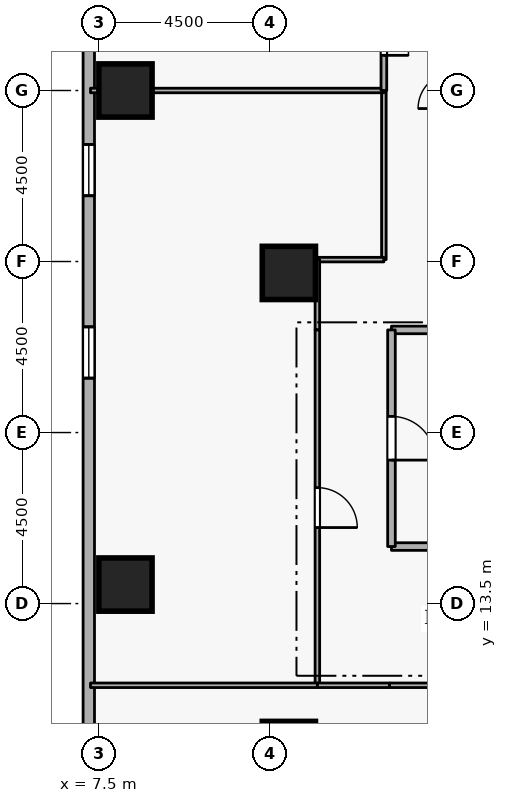
"""IFC4 building model, lengths in metres.
Left out: names, types, materials, properties, quantities, classifications, styles, units other than length and angle.
Written with IfcOpenShell. Run it as: python <this file> out.ifc"""

import sys

from ifc_helpers import new_model, si_unit, direction, frame, frame_2d, origin, origin_2d, place, context, subcontext, project, spatial, rectangle, extrude, element, fill, save


model = new_model("IFC4")
c1 = context("Model", 3, precision=1e-05, world=origin(), true_north=direction((0.0, 1.0)))
c2 = subcontext(c1, "Body", "Model", "MODEL_VIEW")
j1 = project(units=[si_unit("LENGTHUNIT", "METRE"), si_unit("PLANEANGLEUNIT", "RADIAN")], contexts=[c1])
p1 = place(None, origin())
s1 = spatial("IfcSite", under=j1, at=p1, CompositionType="ELEMENT")
p2 = place(p1, origin())
s2 = spatial("IfcBuilding", under=s1, at=p2, CompositionType="ELEMENT")
p3 = place(p2, frame((0.0, 0.0, 68.1)))
s3 = spatial("IfcBuildingStorey", under=s2, at=p3, CompositionType="ELEMENT", Elevation=68.1)
for number, where, z_axis, x_axis in (
    (1, (12.5, 9.7, 0.0), (0.0, 0.0, 1.0), (1.0, 0.0, 0.0)),
    (2, (8.2, 14.0, 0.0), (0.0, 0.0, 1.0), (1.0, 0.0, 0.0)),
    (3, (8.2, 27.0, 0.0), (0.0, 0.0, 1.0), (1.0, 0.0, 0.0)),
    (4, (12.5, 22.2, 0.0), (0.0, 0.0, 1.0), (1.0, 0.0, 0.0)),
):
    element("IfcColumn", number, at=place(p3, frame(where, z_axis=z_axis, x_axis=x_axis)), inside=s3, PredefinedType="COLUMN", context=c2, shape_type="SweptSolid", body=[
        extrude(rectangle(XDim=1.4, YDim=1.4, at=origin_2d()), origin(), (0.0, 0.0, 1.0), 3.6),
    ])
p4 = place(p3, frame((7.235, 42.681, 0.0), z_axis=(0.0, 0.0, 1.0), x_axis=(0.0, -1.0, 0.0)))
e5 = element("IfcWall", 5, at=p4, inside=s3, PredefinedType="STANDARD", context=c2, shape_type="SweptSolid", body=[
    extrude(rectangle(XDim=37.362, YDim=0.3, at=frame_2d((18.681, 0.0))), origin(), (0.0, 0.0, 1.0), 2.66),
])
p5 = place(p4, frame((7.5, 0.0, 0.72)))
e6 = element("IfcOpeningElement", 6, at=p5, cuts=e5, PredefinedType="OPENING", context=c2, shape_type="SweptSolid", body=[
    extrude(rectangle(XDim=1.35, YDim=1.05, at=frame_2d((0.675, 0.525))), frame((0.0, 0.16, 0.0), z_axis=(0.0, -1.0, 0.0), x_axis=(1.0, 0.0, 0.0)), (0.0, 0.0, 1.0), 0.32),
])
p6 = place(p4, frame((17.1, 0.0, 0.72)))
e7 = element("IfcOpeningElement", 7, at=p6, cuts=e5, PredefinedType="OPENING", context=c2, shape_type="SweptSolid", body=[
    extrude(rectangle(XDim=1.35, YDim=1.05, at=frame_2d((0.675, 0.525))), frame((0.0, 0.16, 0.0), z_axis=(0.0, -1.0, 0.0), x_axis=(1.0, 0.0, 0.0)), (0.0, 0.0, 1.0), 0.32),
])
p7 = place(p4, frame((21.9, 0.0, 0.72)))
e8 = element("IfcOpeningElement", 8, at=p7, cuts=e5, PredefinedType="OPENING", context=c2, shape_type="SweptSolid", body=[
    extrude(rectangle(XDim=1.35, YDim=1.05, at=frame_2d((0.675, 0.525))), frame((0.0, 0.16, 0.0), z_axis=(0.0, -1.0, 0.0), x_axis=(1.0, 0.0, 0.0)), (0.0, 0.0, 1.0), 0.32),
])
for number, where, z_axis, x_axis in (
    (9, (15.2, 15.0, 0.0), (0.0, 0.0, 1.0), (1.0, 0.0, 0.0)),
    (10, (17.7, 20.7, 0.0), (0.0, 0.0, 1.0), (-1.0, 0.0, 0.0)),
):
    element("IfcWall", number, at=place(p3, frame(where, z_axis=z_axis, x_axis=x_axis)), inside=s3, PredefinedType="STANDARD", context=c2, shape_type="SweptSolid", body=[
        extrude(rectangle(XDim=2.5, YDim=0.2, at=frame_2d((1.25, 0.0))), origin(), (0.0, 0.0, 1.0), 3.26),
    ])
p8 = place(p3, frame((15.2, 20.7, 0.0), z_axis=(0.0, 0.0, 1.0), x_axis=(0.0, -1.0, 0.0)))
e11 = element("IfcWall", 11, at=p8, inside=s3, PredefinedType="STANDARD", context=c2, shape_type="SweptSolid", body=[
    extrude(rectangle(XDim=5.7, YDim=0.2, at=frame_2d((2.85, 0.0))), origin(), (0.0, 0.0, 1.0), 3.26),
])
p9 = place(p8, frame((2.275, 0.0, 0.0)))
e12 = element("IfcOpeningElement", 12, at=p9, cuts=e11, PredefinedType="OPENING", context=c2, shape_type="SweptSolid", body=[
    extrude(rectangle(XDim=1.15, YDim=2.1, at=frame_2d((0.575, 1.05))), frame((0.0, 0.11, 0.0), z_axis=(0.0, -1.0, 0.0), x_axis=(1.0, 0.0, 0.0)), (0.0, 0.0, 1.0), 0.22),
])
p10 = place(p3, frame((15.0, 27.0, 0.0), z_axis=(0.0, 0.0, 1.0), x_axis=(0.0, -1.0, 0.0)))
e13 = element("IfcWall", 13, at=p10, inside=s3, PredefinedType="PARTITIONING", context=c2, shape_type="SweptSolid", body=[
    extrude(rectangle(XDim=4.45, YDim=0.12, at=frame_2d((2.225, 0.0))), origin(), (0.0, 0.0, 1.0), 3.26),
])
p11 = place(p3, frame((15.0, 22.55, 0.0), z_axis=(0.0, 0.0, 1.0), x_axis=(-1.0, 0.0, 0.0)))
e14 = element("IfcWall", 14, at=p11, inside=s3, PredefinedType="PARTITIONING", context=c2, shape_type="SweptSolid", body=[
    extrude(rectangle(XDim=1.75, YDim=0.12, at=frame_2d((0.875, 0.0))), origin(), (0.0, 0.0, 1.0), 3.26),
])
p12 = place(p3, frame((13.25, 22.55, 0.0), z_axis=(0.0, 0.0, 1.0), x_axis=(0.0, -1.0, 0.0)))
e15 = element("IfcWall", 15, at=p12, inside=s3, PredefinedType="PARTITIONING", context=c2, shape_type="SweptSolid", body=[
    extrude(rectangle(XDim=1.85, YDim=0.12, at=frame_2d((0.925, 0.0))), origin(), (0.0, 0.0, 1.0), 3.26),
])
p13 = place(p3, frame((13.25, 20.7, 0.0), z_axis=(0.0, 0.0, 1.0), x_axis=(0.0, -1.0, 0.0)))
e16 = element("IfcWall", 16, at=p13, inside=s3, PredefinedType="PARTITIONING", context=c2, shape_type="SweptSolid", body=[
    extrude(rectangle(XDim=9.35, YDim=0.12, at=frame_2d((4.675, 0.0))), origin(), (0.0, 0.0, 1.0), 3.26),
])
p14 = place(p13, frame((4.15, 0.0, 0.0)))
e17 = element("IfcOpeningElement", 17, at=p14, cuts=e16, PredefinedType="OPENING", context=c2, shape_type="SweptSolid", body=[
    extrude(rectangle(XDim=1.05, YDim=2.1, at=frame_2d((0.525, 1.05))), frame((0.0, 0.07, 0.0), z_axis=(0.0, -1.0, 0.0), x_axis=(1.0, 0.0, 0.0)), (0.0, 0.0, 1.0), 0.14),
])
p15 = place(p3, frame((13.25, 11.35, 0.0), z_axis=(0.0, 0.0, 1.0), x_axis=(-1.0, 0.0, 0.0)))
e18 = element("IfcWall", 18, at=p15, inside=s3, PredefinedType="PARTITIONING", context=c2, shape_type="SweptSolid", body=[
    extrude(rectangle(XDim=5.97, YDim=0.12, at=frame_2d((2.985, 0.0))), origin(), (0.0, 0.0, 1.0), 3.26),
])
p16 = place(p3, frame((7.28, 27.0, 0.0), z_axis=(0.0, 0.0, 1.0), x_axis=(1.0, 0.0, 0.0)))
e19 = element("IfcWall", 19, at=p16, inside=s3, PredefinedType="PARTITIONING", context=c2, shape_type="SweptSolid", body=[
    extrude(rectangle(XDim=7.72, YDim=0.12, at=frame_2d((3.86, 0.0))), origin(), (0.0, 0.0, 1.0), 2.798),
])
p17 = place(p3, frame((15.0, 30.15, 0.0), z_axis=(0.0, 0.0, 1.0), x_axis=(0.0, -1.0, 0.0)))
e20 = element("IfcWall", 20, at=p17, inside=s3, PredefinedType="PARTITIONING", context=c2, shape_type="SweptSolid", body=[
    extrude(rectangle(XDim=3.15, YDim=0.15, at=frame_2d((1.575, 0.0))), origin(), (0.0, 0.0, 1.0), 3.26),
])
p18 = place(p17, frame((0.925, 0.0, 0.0)))
e21 = element("IfcOpeningElement", 21, at=p18, cuts=e20, PredefinedType="OPENING", context=c2, shape_type="SweptSolid", body=[
    extrude(rectangle(XDim=1.3, YDim=2.12, at=frame_2d((0.65, 1.06))), frame((0.0, 0.085, 0.0), z_axis=(0.0, -1.0, 0.0), x_axis=(1.0, 0.0, 0.0)), (0.0, 0.0, 1.0), 0.17),
])
p19 = place(p3, frame((13.25, 11.35, 0.0), z_axis=(0.0, 0.0, 1.0), x_axis=(1.0, 0.0, 0.0)))
e22 = element("IfcWall", 22, at=p19, inside=s3, PredefinedType="PARTITIONING", context=c2, shape_type="SweptSolid", body=[
    extrude(rectangle(XDim=1.9, YDim=0.12, at=frame_2d((0.95, 0.0))), origin(), (0.0, 0.0, 1.0), 3.26),
])
p20 = place(p3, frame((15.15, 11.35, 0.0), z_axis=(0.0, 0.0, 1.0), x_axis=(1.0, 0.0, 0.0)))
e23 = element("IfcWall", 23, at=p20, inside=s3, PredefinedType="PARTITIONING", context=c2, shape_type="SweptSolid", body=[
    extrude(rectangle(XDim=4.85, YDim=0.12, at=frame_2d((2.425, 0.0))), origin(), (0.0, 0.0, 1.0), 3.26),
])
p21 = place(p20, frame((1.9, 0.0, 0.0)))
e24 = element("IfcOpeningElement", 24, at=p21, cuts=e23, PredefinedType="OPENING", context=c2, shape_type="SweptSolid", body=[
    extrude(rectangle(XDim=1.05, YDim=2.1, at=frame_2d((0.525, 1.05))), frame((0.0, 0.07, 0.0), z_axis=(0.0, -1.0, 0.0), x_axis=(1.0, 0.0, 0.0)), (0.0, 0.0, 1.0), 0.14),
])
p22 = place(p6, origin())
e25 = element("IfcWindow", 25, at=p22, inside=s3, PartitioningType="SINGLE_PANEL", PredefinedType="WINDOW", context=c2, shape_type="SweptSolid", body=[
    extrude(rectangle(XDim=1.35, YDim=1.05, at=frame_2d((0.675, 0.525))), frame((0.0, 0.03, 0.0), z_axis=(0.0, -1.0, 0.0), x_axis=(1.0, 0.0, 0.0)), (0.0, 0.0, 1.0), 0.06),
])
fill(e7, e25)
p23 = place(p7, origin())
e26 = element("IfcWindow", 26, at=p23, inside=s3, PartitioningType="SINGLE_PANEL", PredefinedType="WINDOW", context=c2, shape_type="SweptSolid", body=[
    extrude(rectangle(XDim=1.35, YDim=1.05, at=frame_2d((0.675, 0.525))), frame((0.0, 0.03, 0.0), z_axis=(0.0, -1.0, 0.0), x_axis=(1.0, 0.0, 0.0)), (0.0, 0.0, 1.0), 0.06),
])
fill(e8, e26)
p24 = place(p9, origin())
e27 = element("IfcDoor", 27, at=p24, inside=s3, OperationType="SINGLE_SWING_RIGHT", PredefinedType="DOOR", context=c2, shape_type="SweptSolid", body=[
    extrude(rectangle(XDim=1.15, YDim=2.1, at=frame_2d((0.575, 1.05))), frame((0.0, 0.025, 0.0), z_axis=(0.0, -1.0, 0.0), x_axis=(1.0, 0.0, 0.0)), (0.0, 0.0, 1.0), 0.05),
])
fill(e12, e27)
p25 = place(p14, origin())
e28 = element("IfcDoor", 28, at=p25, inside=s3, OperationType="SINGLE_SWING_RIGHT", PredefinedType="DOOR", context=c2, shape_type="SweptSolid", body=[
    extrude(rectangle(XDim=1.05, YDim=2.1, at=frame_2d((0.525, 1.05))), frame((0.0, 0.025, 0.0), z_axis=(0.0, -1.0, 0.0), x_axis=(1.0, 0.0, 0.0)), (0.0, 0.0, 1.0), 0.05),
])
fill(e17, e28)
p26 = place(p18, origin())
e29 = element("IfcDoor", 29, at=p26, inside=s3, OperationType="DOUBLE_DOOR_SINGLE_SWING", PredefinedType="DOOR", context=c2, shape_type="SweptSolid", body=[
    extrude(rectangle(XDim=1.3, YDim=2.12, at=frame_2d((0.65, 1.06))), frame((0.0, 0.025, 0.0), z_axis=(0.0, -1.0, 0.0), x_axis=(1.0, 0.0, 0.0)), (0.0, 0.0, 1.0), 0.05),
])
fill(e21, e29)
save(model, sys.argv[1])
